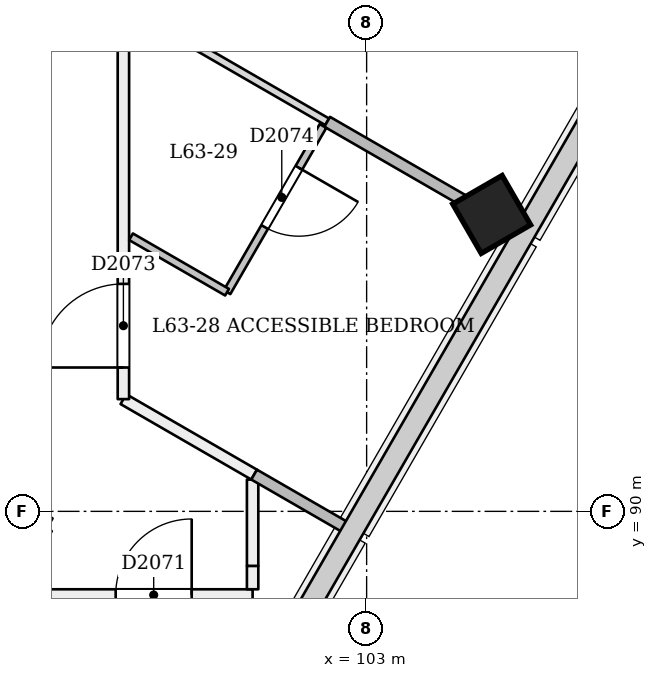
"""IFC4 building model, lengths in metres.
Left out: names, types, materials, properties, quantities, classifications, styles, units other than length and angle.
Written with IfcOpenShell. Run it as: python <this file> out.ifc"""

import sys

from ifc_helpers import new_model, si_unit, direction, frame, frame_2d, origin, origin_2d, place, context, subcontext, project, spatial, rectangle, extrude, element, fill, save


model = new_model("IFC4")
c1 = context("Model", 3, precision=1e-05, world=origin(), true_north=direction((0.0, 1.0)))
c2 = subcontext(c1, "Body", "Model", "MODEL_VIEW")
j1 = project(units=[si_unit("LENGTHUNIT", "METRE"), si_unit("PLANEANGLEUNIT", "RADIAN")], contexts=[c1])
p1 = place(None, origin())
s1 = spatial("IfcSite", under=j1, at=p1, CompositionType="ELEMENT")
p2 = place(p1, origin())
s2 = spatial("IfcBuilding", under=s1, at=p2, CompositionType="ELEMENT")
p3 = place(p2, frame((0.0, 0.0, 246.4)))
s3 = spatial("IfcBuildingStorey", under=s2, at=p3, CompositionType="ELEMENT", Elevation=246.4)
p4 = place(p3, frame((104.672, 93.859, -0.023), z_axis=(-0.02215369191, 0.038413282303, 0.999016333038), x_axis=(-0.500654738192, -0.865363068433, 0.022171894779)))
e1 = element("IfcColumn", 1, at=p4, inside=s3, PredefinedType="COLUMN", context=c2, shape_type="SweptSolid", body=[
    extrude(rectangle(XDim=0.75, YDim=0.75, at=origin_2d()), origin(), (0.0, 0.0, 1.0), 3.604),
])
p5 = place(p3, frame((98.286, 88.9, 0.0), z_axis=(0.0, 0.0, 1.0), x_axis=(1.0, 0.0, 0.0)))
e2 = element("IfcWall", 2, at=p5, inside=s3, PredefinedType="PARTITIONING", context=c2, shape_type="SweptSolid", body=[
    extrude(rectangle(XDim=3.214, YDim=0.15, at=frame_2d((1.607, 0.0))), origin(), (0.0, 0.0, 1.0), 2.7),
])
p6 = place(p5, frame((1.412, 0.0, 0.0)))
e3 = element("IfcOpeningElement", 3, at=p6, cuts=e2, PredefinedType="OPENING", context=c2, shape_type="SweptSolid", body=[
    extrude(rectangle(XDim=1.0, YDim=2.1, at=frame_2d((0.5, 1.05))), frame((0.0, 0.085, 0.0), z_axis=(0.0, -1.0, 0.0), x_axis=(1.0, 0.0, 0.0)), (0.0, 0.0, 1.0), 0.171),
])
p7 = place(p3, frame((101.5, 88.975, 0.0), z_axis=(0.0, 0.0, 1.0), x_axis=(0.0, 1.0, 0.0)))
e4 = element("IfcWall", 4, at=p7, inside=s3, PredefinedType="PARTITIONING", context=c2, shape_type="SweptSolid", body=[
    extrude(rectangle(XDim=0.308, YDim=0.15, at=frame_2d((0.154, 0.0))), origin(), (0.0, 0.0, 1.0), 2.7),
])
p8 = place(p3, frame((101.5, 89.283, 0.0), z_axis=(0.0, 0.0, 1.0), x_axis=(0.0, 1.0, 0.0)))
e5 = element("IfcWall", 5, at=p8, inside=s3, PredefinedType="PARTITIONING", context=c2, shape_type="SweptSolid", body=[
    extrude(rectangle(XDim=1.135, YDim=0.15, at=frame_2d((0.568, 0.0))), origin(), (0.0, 0.0, 1.0), 3.2),
])
p9 = place(p3, frame((101.52, 90.484, 0.0), z_axis=(0.0, 0.0, 1.0), x_axis=(-0.86604843292, 0.499960110246, 0.0)))
e6 = element("IfcWall", 6, at=p9, inside=s3, PredefinedType="PARTITIONING", context=c2, shape_type="SweptSolid", body=[
    extrude(rectangle(XDim=1.986, YDim=0.15, at=frame_2d((0.993, 0.0))), origin(), (0.0, 0.0, 1.0), 3.2),
])
p10 = place(p3, frame((99.8, 91.477, 0.0), z_axis=(0.0, 0.0, 1.0), x_axis=(0.0, 1.0, 0.0)))
e7 = element("IfcWall", 7, at=p10, inside=s3, PredefinedType="PARTITIONING", context=c2, shape_type="SweptSolid", body=[
    extrude(rectangle(XDim=5.196, YDim=0.15, at=frame_2d((2.598, 0.0))), origin(), (0.0, 0.0, 1.0), 3.2),
])
p11 = place(p10, frame((0.416, 0.0, 0.0)))
e8 = element("IfcOpeningElement", 8, at=p11, cuts=e7, PredefinedType="OPENING", context=c2, shape_type="SweptSolid", body=[
    extrude(rectangle(XDim=1.1, YDim=2.1, at=frame_2d((0.55, 1.05))), frame((0.0, 0.085, 0.0), z_axis=(0.0, -1.0, 0.0), x_axis=(1.0, 0.0, 0.0)), (0.0, 0.0, 1.0), 0.171),
])
p12 = place(p3, frame((100.475, 85.891, 0.0), z_axis=(0.0, 0.0, 1.0), x_axis=(-0.866025537322, 0.499999768706, 0.0)))
e9 = element("IfcWall", 9, at=p12, inside=s3, PredefinedType="PARTITIONING", context=c2, shape_type="SweptSolid", body=[
    extrude(rectangle(XDim=6.325, YDim=0.1, at=frame_2d((3.163, 0.0))), origin(), (0.0, 0.0, 1.0), 2.7),
])
p13 = place(p3, frame((102.742, 89.778, 0.0), z_axis=(0.0, 0.0, 1.0), x_axis=(-0.866009885209, 0.500026877998, 0.0)))
e10 = element("IfcWall", 10, at=p13, inside=s3, PredefinedType="PARTITIONING", context=c2, shape_type="SweptSolid", body=[
    extrude(rectangle(XDim=1.412, YDim=0.15, at=frame_2d((0.706, 0.0))), origin(), (0.0, 0.0, 1.0), 2.7),
])
p14 = place(p3, frame((102.426, 95.07, 0.0), z_axis=(0.0, 0.0, 1.0), x_axis=(-0.499976333282, -0.866039067339, 0.0)))
e11 = element("IfcWall", 11, at=p14, inside=s3, PredefinedType="PARTITIONING", context=c2, shape_type="SweptSolid", body=[
    extrude(rectangle(XDim=2.525, YDim=0.1, at=frame_2d((1.262, 0.0))), origin(), (0.0, 0.0, 1.0), 3.2),
])
p15 = place(p14, frame((0.635, 0.0, 0.0)))
e12 = element("IfcOpeningElement", 12, at=p15, cuts=e11, PredefinedType="OPENING", context=c2, shape_type="SweptSolid", body=[
    extrude(rectangle(XDim=0.9, YDim=2.1, at=frame_2d((0.45, 1.05))), frame((0.0, 0.061, 0.0), z_axis=(0.0, -1.0, 0.0), x_axis=(1.0, 0.0, 0.0)), (0.0, 0.0, 1.0), 0.121),
])
p16 = place(p3, frame((101.164, 92.883, 0.0), z_axis=(0.0, 0.0, 1.0), x_axis=(-0.866051847062, 0.499954196102, 0.0)))
e13 = element("IfcWall", 13, at=p16, inside=s3, PredefinedType="PARTITIONING", context=c2, shape_type="SweptSolid", body=[
    extrude(rectangle(XDim=1.459, YDim=0.1, at=frame_2d((0.729, 0.0))), origin(), (0.0, 0.0, 1.0), 3.2),
])
p17 = place(p3, frame((104.975, 93.685, 0.0), z_axis=(0.0, 0.0, 1.0), x_axis=(-0.866033125095, 0.499986626058, 0.0)))
e14 = element("IfcWall", 14, at=p17, inside=s3, PredefinedType="PARTITIONING", context=c2, shape_type="SweptSolid", body=[
    extrude(rectangle(XDim=2.88, YDim=0.15, at=frame_2d((1.44, 0.0))), origin(), (0.0, 0.0, 1.0), 2.7),
])
p18 = place(p3, frame((102.481, 95.125, 0.0), z_axis=(0.0, 0.0, 1.0), x_axis=(-0.866051901885, 0.499954101135, 0.0)))
e15 = element("IfcWall", 15, at=p18, inside=s3, PredefinedType="PARTITIONING", context=c2, shape_type="SweptSolid", body=[
    extrude(rectangle(XDim=2.98, YDim=0.1, at=frame_2d((1.49, 0.0))), origin(), (0.0, 0.0, 1.0), 3.2),
])
p19 = place(p6, origin())
e16 = element("IfcDoor", 16, at=p19, inside=s3, OperationType="SINGLE_SWING_RIGHT", PredefinedType="NOTDEFINED", context=c2, shape_type="SweptSolid", body=[
    extrude(rectangle(XDim=1.0, YDim=2.1, at=frame_2d((0.5, 1.05))), frame((0.0, 0.025, 0.0), z_axis=(0.0, -1.0, 0.0), x_axis=(1.0, 0.0, 0.0)), (0.0, 0.0, 1.0), 0.05),
])
fill(e3, e16)
p20 = place(p11, origin())
e17 = element("IfcDoor", 17, at=p20, inside=s3, OperationType="SINGLE_SWING_LEFT", PredefinedType="NOTDEFINED", context=c2, shape_type="SweptSolid", body=[
    extrude(rectangle(XDim=1.1, YDim=2.1, at=frame_2d((0.55, 1.05))), frame((0.0, 0.025, 0.0), z_axis=(0.0, -1.0, 0.0), x_axis=(1.0, 0.0, 0.0)), (0.0, 0.0, 1.0), 0.05),
])
fill(e8, e17)
p21 = place(p15, origin())
e18 = element("IfcDoor", 18, at=p21, inside=s3, OperationType="SINGLE_SWING_LEFT", PredefinedType="NOTDEFINED", context=c2, shape_type="SweptSolid", body=[
    extrude(rectangle(XDim=0.9, YDim=2.1, at=frame_2d((0.45, 1.05))), frame((0.0, 0.025, 0.0), z_axis=(0.0, -1.0, 0.0), x_axis=(1.0, 0.0, 0.0)), (0.0, 0.0, 1.0), 0.05),
])
fill(e12, e18)
save(model, sys.argv[1])
